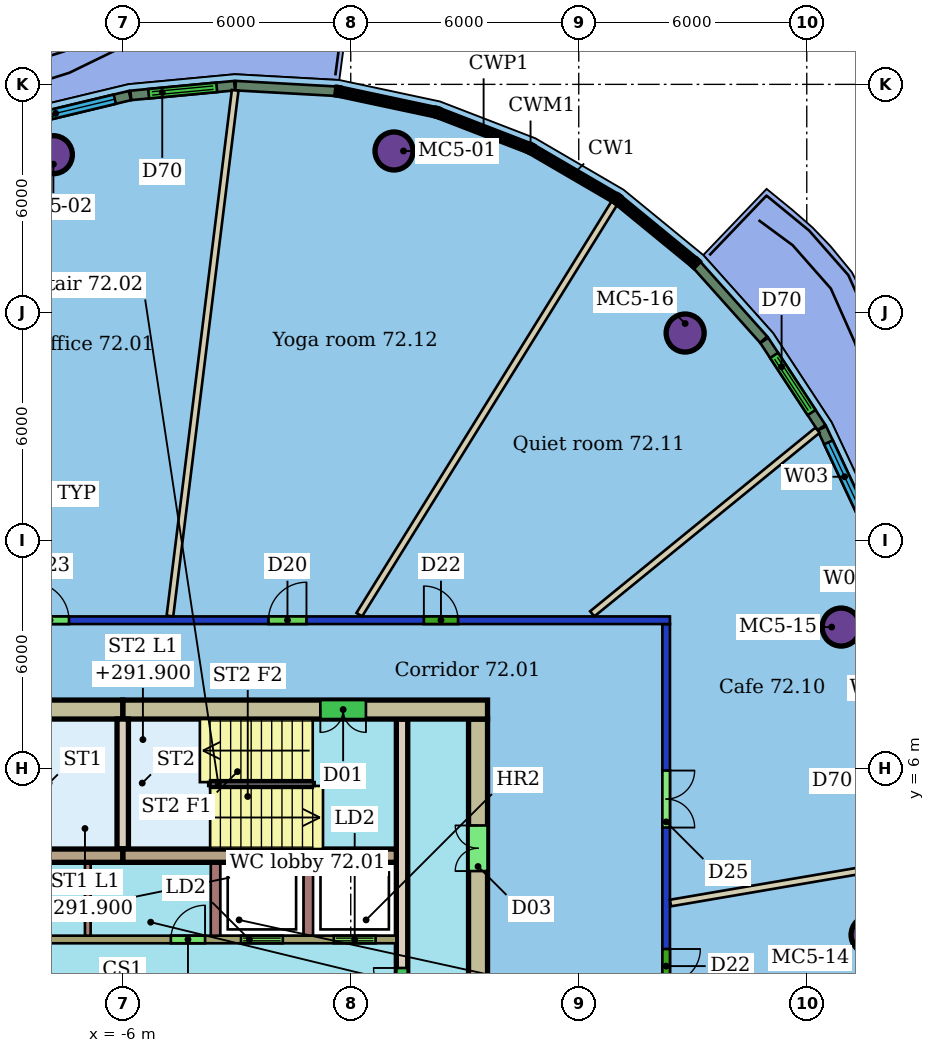
"""IFC4 building model, lengths in metres.
Left out: names, types, materials, properties, quantities, classifications, styles, units other than length and angle.
Written with IfcOpenShell. Run it as: python <this file> out.ifc"""

import sys

from ifc_helpers import new_model, si_unit, direction, frame, frame_2d, origin, origin_2d, place, context, subcontext, project, spatial, rectangle, hollow_circle, extrude, element, fill, save


model = new_model("IFC4")
c1 = context("Model", 3, precision=1e-05, world=origin(), true_north=direction((0.0, 1.0)))
c2 = subcontext(c1, "Body", "Model", "MODEL_VIEW")
j1 = project(units=[si_unit("LENGTHUNIT", "METRE"), si_unit("PLANEANGLEUNIT", "RADIAN")], contexts=[c1])
p1 = place(None, origin())
s1 = spatial("IfcSite", under=j1, at=p1, CompositionType="ELEMENT")
p2 = place(p1, origin())
s2 = spatial("IfcBuilding", under=s1, at=p2, CompositionType="ELEMENT")
p3 = place(p2, frame((0.0, 0.0, 290.1)))
s3 = spatial("IfcBuildingStorey", under=s2, at=p3, CompositionType="ELEMENT", Elevation=290.1)
for number, where, z_axis, x_axis in (
    (1, (1.138, 22.247, 0.0), (0.0, 0.0, 1.0), (1.0, 0.0, 0.0)),
    (2, (-7.825, 22.149, 0.0), (0.0, 0.0, 1.0), (1.0, 0.0, 0.0)),
    (3, (13.666, 1.62, 0.0), (0.0, 0.0, 1.0), (1.0, 0.0, 0.0)),
    (4, (12.906, 9.72, 0.0), (0.0, 0.0, 1.0), (1.0, 0.0, 0.0)),
    (5, (8.8, 17.457, 0.0), (0.0, 0.0, 1.0), (1.0, 0.0, 0.0)),
):
    element("IfcColumn", number, at=place(p3, frame(where, z_axis=z_axis, x_axis=x_axis)), inside=s3, PredefinedType="COLUMN", context=c2, shape_type="SweptSolid", body=[
        extrude(hollow_circle(Radius=0.5, WallThickness=0.04, at=origin_2d()), origin(), (0.0, 0.0, 1.0), 3.45),
    ])
p4 = place(p3, frame((-20.4, 9.9, 0.0), z_axis=(0.0, 0.0, 1.0), x_axis=(1.0, 0.0, 0.0)))
e6 = element("IfcWall", 6, at=p4, inside=s3, PredefinedType="PARTITIONING", context=c2, shape_type="SweptSolid", body=[
    extrude(rectangle(XDim=28.8, YDim=0.2, at=frame_2d((14.4, 0.0))), origin(), (0.0, 0.0, 1.0), 3.1),
])
p5 = place(p4, frame((11.987, 0.0, 0.0)))
e7 = element("IfcOpeningElement", 7, at=p5, cuts=e6, PredefinedType="OPENING", context=c2, shape_type="SweptSolid", body=[
    extrude(rectangle(XDim=1.0, YDim=2.4, at=frame_2d((0.5, 1.2))), frame((0.0, 0.11, 0.0), z_axis=(0.0, -1.0, 0.0), x_axis=(1.0, 0.0, 0.0)), (0.0, 0.0, 1.0), 0.22),
])
p6 = place(p4, frame((5.934, 0.0, 0.0)))
e8 = element("IfcOpeningElement", 8, at=p6, cuts=e6, PredefinedType="OPENING", context=c2, shape_type="SweptSolid", body=[
    extrude(rectangle(XDim=1.8, YDim=2.4, at=frame_2d((0.9, 1.2))), frame((0.0, 0.11, 0.0), z_axis=(0.0, -1.0, 0.0), x_axis=(1.0, 0.0, 0.0)), (0.0, 0.0, 1.0), 0.22),
])
p7 = place(p4, frame((22.324, 0.0, 0.0)))
e9 = element("IfcOpeningElement", 9, at=p7, cuts=e6, PredefinedType="OPENING", context=c2, shape_type="SweptSolid", body=[
    extrude(rectangle(XDim=0.9, YDim=2.1, at=frame_2d((0.45, 1.05))), frame((0.0, 0.11, 0.0), z_axis=(0.0, -1.0, 0.0), x_axis=(1.0, 0.0, 0.0)), (0.0, 0.0, 1.0), 0.22),
])
p8 = place(p4, frame((18.235, 0.0, 0.0)))
e10 = element("IfcOpeningElement", 10, at=p8, cuts=e6, PredefinedType="OPENING", context=c2, shape_type="SweptSolid", body=[
    extrude(rectangle(XDim=1.0, YDim=2.1, at=frame_2d((0.5, 1.05))), frame((0.0, 0.11, 0.0), z_axis=(0.0, -1.0, 0.0), x_axis=(1.0, 0.0, 0.0)), (0.0, 0.0, 1.0), 0.22),
])
p9 = place(p3, frame((8.3, 9.8, 0.0), z_axis=(0.0, 0.0, 1.0), x_axis=(0.0, -1.0, 0.0)))
e11 = element("IfcWall", 11, at=p9, inside=s3, PredefinedType="PARTITIONING", context=c2, shape_type="SweptSolid", body=[
    extrude(rectangle(XDim=19.6, YDim=0.2, at=frame_2d((9.8, 0.0))), origin(), (0.0, 0.0, 1.0), 3.1),
])
p10 = place(p9, frame((13.839, 0.0, 0.0)))
e12 = element("IfcOpeningElement", 12, at=p10, cuts=e11, PredefinedType="OPENING", context=c2, shape_type="SweptSolid", body=[
    extrude(rectangle(XDim=1.5, YDim=2.1, at=frame_2d((0.75, 1.05))), frame((0.0, 0.11, 0.0), z_axis=(0.0, -1.0, 0.0), x_axis=(1.0, 0.0, 0.0)), (0.0, 0.0, 1.0), 0.22),
])
p11 = place(p9, frame((8.55, 0.0, 0.0)))
e13 = element("IfcOpeningElement", 13, at=p11, cuts=e11, PredefinedType="OPENING", context=c2, shape_type="SweptSolid", body=[
    extrude(rectangle(XDim=0.9, YDim=2.1, at=frame_2d((0.45, 1.05))), frame((0.0, 0.11, 0.0), z_axis=(0.0, -1.0, 0.0), x_axis=(1.0, 0.0, 0.0)), (0.0, 0.0, 1.0), 0.22),
])
p12 = place(p9, frame((3.855, 0.0, 0.0)))
e14 = element("IfcOpeningElement", 14, at=p12, cuts=e11, PredefinedType="OPENING", context=c2, shape_type="SweptSolid", body=[
    extrude(rectangle(XDim=1.5, YDim=2.4, at=frame_2d((0.75, 1.2))), frame((0.0, 0.11, 0.0), z_axis=(0.0, -1.0, 0.0), x_axis=(1.0, 0.0, 0.0)), (0.0, 0.0, 1.0), 0.22),
])
p13 = place(p3, frame((-3.042, 23.842, 0.0), z_axis=(0.0, 0.0, 1.0), x_axis=(-0.123142143045, -0.99238904297, 0.0)))
e15 = element("IfcWall", 15, at=p13, inside=s3, PredefinedType="PARTITIONING", context=c2, shape_type="SweptSolid", body=[
    extrude(rectangle(XDim=13.938, YDim=0.175, at=frame_2d((6.969, 0.0))), origin(), (0.0, 0.0, 1.0), 3.45),
])
p14 = place(p3, frame((15.029, 3.588, 0.0), z_axis=(0.0, 0.0, 1.0), x_axis=(-0.985756294693, -0.168180044814, 0.0)))
e16 = element("IfcWall", 16, at=p14, inside=s3, PredefinedType="PARTITIONING", context=c2, shape_type="SweptSolid", body=[
    extrude(rectangle(XDim=6.709, YDim=0.175, at=frame_2d((3.355, 0.0))), origin(), (0.0, 0.0, 1.0), 3.45),
])
p15 = place(p3, frame((12.284, 14.9, 0.0), z_axis=(0.0, 0.0, 1.0), x_axis=(-0.775191568624, -0.631726231792, 0.0)))
e17 = element("IfcWall", 17, at=p15, inside=s3, PredefinedType="PARTITIONING", context=c2, shape_type="SweptSolid", body=[
    extrude(rectangle(XDim=7.649, YDim=0.175, at=frame_2d((3.825, 0.0))), origin(), (0.0, 0.0, 1.0), 3.45),
])
p16 = place(p3, frame((6.938, 20.878, 0.0), z_axis=(0.0, 0.0, 1.0), x_axis=(-0.526747010392, -0.850022109738, 0.0)))
e18 = element("IfcWall", 18, at=p16, inside=s3, PredefinedType="PARTITIONING", context=c2, shape_type="SweptSolid", body=[
    extrude(rectangle(XDim=12.743, YDim=0.175, at=frame_2d((6.371, 0.0))), origin(), (0.0, 0.0, 1.0), 3.45),
])
p17 = place(p3, frame((-0.396, 23.82, 0.0), z_axis=(0.0, 0.0, 1.0), x_axis=(-0.998463198624, 0.055418778352, 0.0)))
e19 = element("IfcWall", 19, at=p17, inside=s3, PredefinedType="SOLIDWALL", context=c2, shape_type="SweptSolid", body=[
    extrude(rectangle(XDim=2.639, YDim=0.25, at=frame_2d((1.319, 0.0))), origin(), (0.0, 0.0, 1.0), 3.15),
])
p18 = place(p3, frame((-3.057, 23.966, 0.0), z_axis=(0.0, 0.0, 1.0), x_axis=(-0.995626981475, -0.093417952019, 0.0)))
e20 = element("IfcWall", 20, at=p18, inside=s3, PredefinedType="SOLIDWALL", context=c2, shape_type="SweptSolid", body=[
    extrude(rectangle(XDim=2.741, YDim=0.25, at=frame_2d((1.371, 0.0))), origin(), (0.0, 0.0, 1.0), 3.15),
])
p19 = place(p18, frame((0.471, 0.0, 0.0)))
e21 = element("IfcOpeningElement", 21, at=p19, cuts=e20, PredefinedType="OPENING", context=c2, shape_type="SweptSolid", body=[
    extrude(rectangle(XDim=1.8, YDim=2.4, at=frame_2d((0.9, 1.2))), frame((0.0, 0.135, 0.0), z_axis=(0.0, -1.0, 0.0), x_axis=(1.0, 0.0, 0.0)), (0.0, 0.0, 1.0), 0.27),
])
p20 = place(p3, frame((-5.812, 23.706, 0.0), z_axis=(0.0, 0.0, 1.0), x_axis=(-0.972306924108, -0.233707606491, 0.0)))
e22 = element("IfcWall", 22, at=p20, inside=s3, PredefinedType="SOLIDWALL", context=c2, shape_type="SweptSolid", body=[
    extrude(rectangle(XDim=2.814, YDim=0.25, at=frame_2d((1.407, 0.0))), origin(), (0.0, 0.0, 1.0), 3.15),
])
p21 = place(p20, frame((0.407, 0.0, 0.9)))
e23 = element("IfcOpeningElement", 23, at=p21, cuts=e22, PredefinedType="OPENING", context=c2, shape_type="SweptSolid", body=[
    extrude(rectangle(XDim=2.0, YDim=2.1, at=frame_2d((1.0, 1.05))), frame((0.0, 0.135, 0.0), z_axis=(0.0, -1.0, 0.0), x_axis=(1.0, 0.0, 0.0)), (0.0, 0.0, 1.0), 0.27),
])
p22 = place(p3, frame((13.594, 12.401, 0.0), z_axis=(0.0, 0.0, 1.0), x_axis=(-0.424551668491, 0.905403711491, 0.0)))
e24 = element("IfcWall", 24, at=p22, inside=s3, PredefinedType="SOLIDWALL", context=c2, shape_type="SweptSolid", body=[
    extrude(rectangle(XDim=2.814, YDim=0.25, at=frame_2d((1.407, 0.0))), origin(), (0.0, 0.0, 1.0), 3.15),
])
p23 = place(p22, frame((0.407, 0.0, 0.9)))
e25 = element("IfcOpeningElement", 25, at=p23, cuts=e24, PredefinedType="OPENING", context=c2, shape_type="SweptSolid", body=[
    extrude(rectangle(XDim=2.0, YDim=2.1, at=frame_2d((1.0, 1.05))), frame((0.0, 0.135, 0.0), z_axis=(0.0, -1.0, 0.0), x_axis=(1.0, 0.0, 0.0)), (0.0, 0.0, 1.0), 0.27),
])
p24 = place(p3, frame((12.386, 14.972, 0.0), z_axis=(0.0, 0.0, 1.0), x_axis=(-0.548705074574, 0.83601599335, 0.0)))
e26 = element("IfcWall", 26, at=p24, inside=s3, PredefinedType="SOLIDWALL", context=c2, shape_type="SweptSolid", body=[
    extrude(rectangle(XDim=2.741, YDim=0.25, at=frame_2d((1.371, 0.0))), origin(), (0.0, 0.0, 1.0), 3.15),
])
p25 = place(p24, frame((0.471, 0.0, 0.0)))
e27 = element("IfcOpeningElement", 27, at=p25, cuts=e26, PredefinedType="OPENING", context=c2, shape_type="SweptSolid", body=[
    extrude(rectangle(XDim=1.8, YDim=2.4, at=frame_2d((0.9, 1.2))), frame((0.0, 0.135, 0.0), z_axis=(0.0, -1.0, 0.0), x_axis=(1.0, 0.0, 0.0)), (0.0, 0.0, 1.0), 0.27),
])
p26 = place(p3, frame((10.866, 17.285, 0.0), z_axis=(0.0, 0.0, 1.0), x_axis=(-0.666789450608, 0.745246152997, 0.0)))
e28 = element("IfcWall", 28, at=p26, inside=s3, PredefinedType="SOLIDWALL", context=c2, shape_type="SweptSolid", body=[
    extrude(rectangle(XDim=2.639, YDim=0.25, at=frame_2d((1.319, 0.0))), origin(), (0.0, 0.0, 1.0), 3.15),
])
p27 = place(p3, frame((3.6, 7.55, 0.0), z_axis=(0.0, 0.0, 1.0), x_axis=(-1.0, 0.0, 0.0)))
e29 = element("IfcWall", 29, at=p27, inside=s3, PredefinedType="SHEAR", context=c2, shape_type="SweptSolid", body=[
    extrude(rectangle(XDim=9.6, YDim=0.5, at=frame_2d((4.8, 0.0))), origin(), (0.0, 0.0, 1.0), 3.3),
])
p28 = place(p27, frame((3.2, 0.0, 0.0)))
e30 = element("IfcOpeningElement", 30, at=p28, cuts=e29, PredefinedType="OPENING", context=c2, shape_type="SweptSolid", body=[
    extrude(rectangle(XDim=1.2, YDim=2.1, at=frame_2d((0.6, 1.05))), frame((0.0, 0.26, 0.0), z_axis=(0.0, -1.0, 0.0), x_axis=(1.0, 0.0, 0.0)), (0.0, 0.0, 1.0), 0.52),
])
p29 = place(p3, frame((-6.0, 7.55, 0.0), z_axis=(0.0, 0.0, 1.0), x_axis=(-1.0, 0.0, 0.0)))
e31 = element("IfcWall", 31, at=p29, inside=s3, PredefinedType="SHEAR", context=c2, shape_type="SweptSolid", body=[
    extrude(rectangle(XDim=9.6, YDim=0.5, at=frame_2d((4.8, 0.0))), origin(), (0.0, 0.0, 1.0), 3.3),
])
p30 = place(p29, frame((5.2, 0.0, 0.0)))
e32 = element("IfcOpeningElement", 32, at=p30, cuts=e31, PredefinedType="OPENING", context=c2, shape_type="SweptSolid", body=[
    extrude(rectangle(XDim=1.2, YDim=2.1, at=frame_2d((0.6, 1.05))), frame((0.0, 0.26, 0.0), z_axis=(0.0, -1.0, 0.0), x_axis=(1.0, 0.0, 0.0)), (0.0, 0.0, 1.0), 0.52),
])
p31 = place(p3, frame((3.35, -7.3, 0.0), z_axis=(0.0, 0.0, 1.0), x_axis=(0.0, 1.0, 0.0)))
e33 = element("IfcWall", 33, at=p31, inside=s3, PredefinedType="SHEAR", context=c2, shape_type="SweptSolid", body=[
    extrude(rectangle(XDim=14.6, YDim=0.5, at=frame_2d((7.3, 0.0))), origin(), (0.0, 0.0, 1.0), 3.3),
])
p32 = place(p31, frame((2.8, 0.0, 0.0)))
e34 = element("IfcOpeningElement", 34, at=p32, cuts=e33, PredefinedType="OPENING", context=c2, shape_type="SweptSolid", body=[
    extrude(rectangle(XDim=1.2, YDim=2.1, at=frame_2d((0.6, 1.05))), frame((0.0, 0.26, 0.0), z_axis=(0.0, -1.0, 0.0), x_axis=(1.0, 0.0, 0.0)), (0.0, 0.0, 1.0), 0.52),
])
p33 = place(p31, frame((10.6, 0.0, 0.0)))
e35 = element("IfcOpeningElement", 35, at=p33, cuts=e33, PredefinedType="OPENING", context=c2, shape_type="SweptSolid", body=[
    extrude(rectangle(XDim=1.2, YDim=2.1, at=frame_2d((0.6, 1.05))), frame((0.0, 0.26, 0.0), z_axis=(0.0, -1.0, 0.0), x_axis=(1.0, 0.0, 0.0)), (0.0, 0.0, 1.0), 0.52),
])
for number, where, z_axis, x_axis in (
    (36, (-13.2, 3.705, 0.0), (0.0, 0.0, 1.0), (1.0, 0.0, 0.0)),
    (37, (-6.0, 3.705, 0.0), (0.0, 0.0, 1.0), (1.0, 0.0, 0.0)),
):
    element("IfcWall", number, at=place(p3, frame(where, z_axis=z_axis, x_axis=x_axis)), inside=s3, PredefinedType="SHEAR", context=c2, shape_type="SweptSolid", body=[
        extrude(rectangle(XDim=7.2, YDim=0.35, at=frame_2d((3.6, 0.0))), origin(), (0.0, 0.0, 1.0), 3.3),
    ])
p34 = place(p3, frame((1.35, -7.3, 0.0), z_axis=(0.0, 0.0, 1.0), x_axis=(0.0, 1.0, 0.0)))
e38 = element("IfcWall", 38, at=p34, inside=s3, PredefinedType="SHEAR", context=c2, shape_type="SweptSolid", body=[
    extrude(rectangle(XDim=14.6, YDim=0.3, at=frame_2d((7.3, 0.0))), origin(), (0.0, 0.0, 1.0), 3.3),
])
p35 = place(p34, frame((1.21, 0.0, 0.0)))
e39 = element("IfcOpeningElement", 39, at=p35, cuts=e38, PredefinedType="OPENING", context=c2, shape_type="SweptSolid", body=[
    extrude(rectangle(XDim=1.0, YDim=2.1, at=frame_2d((0.5, 1.05))), frame((0.0, 0.16, 0.0), z_axis=(0.0, -1.0, 0.0), x_axis=(1.0, 0.0, 0.0)), (0.0, 0.0, 1.0), 0.32),
])
p36 = place(p34, frame((6.55, 0.0, 0.0)))
e40 = element("IfcOpeningElement", 40, at=p36, cuts=e38, PredefinedType="OPENING", context=c2, shape_type="SweptSolid", body=[
    extrude(rectangle(XDim=1.5, YDim=2.1, at=frame_2d((0.75, 1.05))), frame((0.0, 0.16, 0.0), z_axis=(0.0, -1.0, 0.0), x_axis=(1.0, 0.0, 0.0)), (0.0, 0.0, 1.0), 0.32),
])
p37 = place(p3, frame((-13.2, 1.5, 0.0), z_axis=(0.0, 0.0, 1.0), x_axis=(1.0, 0.0, 0.0)))
e41 = element("IfcWall", 41, at=p37, inside=s3, PredefinedType="SHEAR", context=c2, shape_type="SweptSolid", body=[
    extrude(rectangle(XDim=14.4, YDim=0.2, at=frame_2d((7.2, 0.0))), origin(), (0.0, 0.0, 1.0), 3.3),
])
p38 = place(p37, frame((10.312, 0.0, 0.0)))
e42 = element("IfcOpeningElement", 42, at=p38, cuts=e41, PredefinedType="OPENING", context=c2, shape_type="SweptSolid", body=[
    extrude(rectangle(XDim=1.1, YDim=2.1, at=frame_2d((0.55, 1.05))), frame((0.0, 0.11, 0.0), z_axis=(0.0, -1.0, 0.0), x_axis=(1.0, 0.0, 0.0)), (0.0, 0.0, 1.0), 0.22),
])
p39 = place(p37, frame((12.754, 0.0, 0.0)))
e43 = element("IfcOpeningElement", 43, at=p39, cuts=e41, PredefinedType="OPENING", context=c2, shape_type="SweptSolid", body=[
    extrude(rectangle(XDim=1.1, YDim=2.1, at=frame_2d((0.55, 1.05))), frame((0.0, 0.11, 0.0), z_axis=(0.0, -1.0, 0.0), x_axis=(1.0, 0.0, 0.0)), (0.0, 0.0, 1.0), 0.22),
])
p40 = place(p37, frame((0.15, 0.0, 0.0)))
e44 = element("IfcOpeningElement", 44, at=p40, cuts=e41, PredefinedType="OPENING", context=c2, shape_type="SweptSolid", body=[
    extrude(rectangle(XDim=1.0, YDim=2.1, at=frame_2d((0.5, 1.05))), frame((0.0, 0.11, 0.0), z_axis=(0.0, -1.0, 0.0), x_axis=(1.0, 0.0, 0.0)), (0.0, 0.0, 1.0), 0.22),
])
p41 = place(p37, frame((3.365, 0.0, 0.0)))
e45 = element("IfcOpeningElement", 45, at=p41, cuts=e41, PredefinedType="OPENING", context=c2, shape_type="SweptSolid", body=[
    extrude(rectangle(XDim=1.0, YDim=2.1, at=frame_2d((0.5, 1.05))), frame((0.0, 0.11, 0.0), z_axis=(0.0, -1.0, 0.0), x_axis=(1.0, 0.0, 0.0)), (0.0, 0.0, 1.0), 0.22),
])
p42 = place(p37, frame((8.467, 0.0, 0.0)))
e46 = element("IfcOpeningElement", 46, at=p42, cuts=e41, PredefinedType="OPENING", context=c2, shape_type="SweptSolid", body=[
    extrude(rectangle(XDim=0.9, YDim=2.1, at=frame_2d((0.45, 1.05))), frame((0.0, 0.11, 0.0), z_axis=(0.0, -1.0, 0.0), x_axis=(1.0, 0.0, 0.0)), (0.0, 0.0, 1.0), 0.22),
])
p43 = place(p3, frame((-6.0, 3.88, 0.0), z_axis=(0.0, 0.0, 1.0), x_axis=(0.0, 1.0, 0.0)))
e47 = element("IfcWall", 47, at=p43, inside=s3, PredefinedType="SHEAR", context=c2, shape_type="SweptSolid", body=[
    extrude(rectangle(XDim=3.42, YDim=0.3, at=frame_2d((1.71, 0.0))), origin(), (0.0, 0.0, 1.0), 3.3),
])
for number, where, z_axis, x_axis in (
    (48, (-3.558, 1.6, 0.0), (0.0, 0.0, 1.0), (0.0, 1.0, 0.0)),
    (49, (-1.117, 1.6, 0.0), (0.0, 0.0, 1.0), (0.0, 1.0, 0.0)),
):
    element("IfcWall", number, at=place(p3, frame(where, z_axis=z_axis, x_axis=x_axis)), inside=s3, PredefinedType="SHEAR", context=c2, shape_type="SweptSolid", body=[
        extrude(rectangle(XDim=1.93, YDim=0.25, at=frame_2d((0.965, 0.0))), origin(), (0.0, 0.0, 1.0), 3.3),
    ])
p44 = place(p3, frame((-6.919, 1.6, 0.0), z_axis=(0.0, 0.0, 1.0), x_axis=(0.0, 1.0, 0.0)))
e50 = element("IfcWall", 50, at=p44, inside=s3, PredefinedType="PARTITIONING", context=c2, shape_type="SweptSolid", body=[
    extrude(rectangle(XDim=1.93, YDim=0.15, at=frame_2d((0.965, 0.0))), origin(), (0.0, 0.0, 1.0), 3.3),
])
p45 = place(p5, origin())
e51 = element("IfcDoor", 51, at=p45, inside=s3, OperationType="SINGLE_SWING_LEFT", PredefinedType="DOOR", context=c2, shape_type="SweptSolid", body=[
    extrude(rectangle(XDim=1.0, YDim=2.4, at=frame_2d((0.5, 1.2))), frame((0.0, 0.025, 0.0), z_axis=(0.0, -1.0, 0.0), x_axis=(1.0, 0.0, 0.0)), (0.0, 0.0, 1.0), 0.05),
])
fill(e7, e51)
p46 = place(p11, origin())
e52 = element("IfcDoor", 52, at=p46, inside=s3, OperationType="SINGLE_SWING_LEFT", PredefinedType="DOOR", context=c2, shape_type="SweptSolid", body=[
    extrude(rectangle(XDim=0.9, YDim=2.1, at=frame_2d((0.45, 1.05))), frame((0.0, 0.025, 0.0), z_axis=(0.0, -1.0, 0.0), x_axis=(1.0, 0.0, 0.0)), (0.0, 0.0, 1.0), 0.05),
])
fill(e13, e52)
p47 = place(p12, origin())
e53 = element("IfcDoor", 53, at=p47, inside=s3, OperationType="DOUBLE_DOOR_SINGLE_SWING", PredefinedType="DOOR", context=c2, shape_type="SweptSolid", body=[
    extrude(rectangle(XDim=1.5, YDim=2.4, at=frame_2d((0.75, 1.2))), frame((0.0, 0.025, 0.0), z_axis=(0.0, -1.0, 0.0), x_axis=(1.0, 0.0, 0.0)), (0.0, 0.0, 1.0), 0.05),
])
fill(e14, e53)
p48 = place(p7, origin())
e54 = element("IfcDoor", 54, at=p48, inside=s3, OperationType="SINGLE_SWING_LEFT", PredefinedType="DOOR", context=c2, shape_type="SweptSolid", body=[
    extrude(rectangle(XDim=0.9, YDim=2.1, at=frame_2d((0.45, 1.05))), frame((0.0, 0.025, 0.0), z_axis=(0.0, -1.0, 0.0), x_axis=(1.0, 0.0, 0.0)), (0.0, 0.0, 1.0), 0.05),
])
fill(e9, e54)
p49 = place(p8, origin())
e55 = element("IfcDoor", 55, at=p49, inside=s3, OperationType="SINGLE_SWING_RIGHT", PredefinedType="DOOR", context=c2, shape_type="SweptSolid", body=[
    extrude(rectangle(XDim=1.0, YDim=2.1, at=frame_2d((0.5, 1.05))), frame((0.0, 0.025, 0.0), z_axis=(0.0, -1.0, 0.0), x_axis=(1.0, 0.0, 0.0)), (0.0, 0.0, 1.0), 0.05),
])
fill(e10, e55)
p50 = place(p19, origin())
e56 = element("IfcDoor", 56, at=p50, inside=s3, OperationType="DOUBLE_DOOR_SLIDING", PredefinedType="DOOR", context=c2, shape_type="SweptSolid", body=[
    extrude(rectangle(XDim=1.8, YDim=2.4, at=frame_2d((0.9, 1.2))), frame((0.0, 0.025, 0.0), z_axis=(0.0, -1.0, 0.0), x_axis=(1.0, 0.0, 0.0)), (0.0, 0.0, 1.0), 0.05),
])
fill(e21, e56)
p51 = place(p21, origin())
e57 = element("IfcWindow", 57, at=p51, inside=s3, PartitioningType="SINGLE_PANEL", PredefinedType="WINDOW", context=c2, shape_type="SweptSolid", body=[
    extrude(rectangle(XDim=2.0, YDim=2.1, at=frame_2d((1.0, 1.05))), frame((0.0, 0.03, 0.0), z_axis=(0.0, -1.0, 0.0), x_axis=(1.0, 0.0, 0.0)), (0.0, 0.0, 1.0), 0.06),
])
fill(e23, e57)
p52 = place(p23, origin())
e58 = element("IfcWindow", 58, at=p52, inside=s3, PartitioningType="SINGLE_PANEL", PredefinedType="WINDOW", context=c2, shape_type="SweptSolid", body=[
    extrude(rectangle(XDim=2.0, YDim=2.1, at=frame_2d((1.0, 1.05))), frame((0.0, 0.03, 0.0), z_axis=(0.0, -1.0, 0.0), x_axis=(1.0, 0.0, 0.0)), (0.0, 0.0, 1.0), 0.06),
])
fill(e25, e58)
p53 = place(p25, origin())
e59 = element("IfcDoor", 59, at=p53, inside=s3, OperationType="DOUBLE_DOOR_SLIDING", PredefinedType="DOOR", context=c2, shape_type="SweptSolid", body=[
    extrude(rectangle(XDim=1.8, YDim=2.4, at=frame_2d((0.9, 1.2))), frame((0.0, 0.025, 0.0), z_axis=(0.0, -1.0, 0.0), x_axis=(1.0, 0.0, 0.0)), (0.0, 0.0, 1.0), 0.05),
])
fill(e27, e59)
p54 = place(p28, origin())
e60 = element("IfcDoor", 60, at=p54, inside=s3, OperationType="DOUBLE_DOOR_SINGLE_SWING", PredefinedType="NOTDEFINED", context=c2, shape_type="SweptSolid", body=[
    extrude(rectangle(XDim=1.2, YDim=2.1, at=frame_2d((0.6, 1.05))), frame((0.0, 0.025, 0.0), z_axis=(0.0, -1.0, 0.0), x_axis=(1.0, 0.0, 0.0)), (0.0, 0.0, 1.0), 0.05),
])
fill(e30, e60)
p55 = place(p33, origin())
e61 = element("IfcDoor", 61, at=p55, inside=s3, OperationType="DOUBLE_DOOR_SINGLE_SWING", PredefinedType="NOTDEFINED", context=c2, shape_type="SweptSolid", body=[
    extrude(rectangle(XDim=1.2, YDim=2.1, at=frame_2d((0.6, 1.05))), frame((0.0, 0.025, 0.0), z_axis=(0.0, -1.0, 0.0), x_axis=(1.0, 0.0, 0.0)), (0.0, 0.0, 1.0), 0.05),
])
fill(e35, e61)
p56 = place(p36, origin())
e62 = element("IfcDoor", 62, at=p56, inside=s3, OperationType="DOUBLE_DOOR_SINGLE_SWING", PredefinedType="NOTDEFINED", context=c2, shape_type="SweptSolid", body=[
    extrude(rectangle(XDim=1.5, YDim=2.1, at=frame_2d((0.75, 1.05))), frame((0.0, 0.025, 0.0), z_axis=(0.0, -1.0, 0.0), x_axis=(1.0, 0.0, 0.0)), (0.0, 0.0, 1.0), 0.05),
])
fill(e40, e62)
p57 = place(p38, origin())
e63 = element("IfcDoor", 63, at=p57, inside=s3, OperationType="DOUBLE_DOOR_SLIDING", PredefinedType="NOTDEFINED", context=c2, shape_type="SweptSolid", body=[
    extrude(rectangle(XDim=1.1, YDim=2.1, at=frame_2d((0.55, 1.05))), frame((0.0, 0.025, 0.0), z_axis=(0.0, -1.0, 0.0), x_axis=(1.0, 0.0, 0.0)), (0.0, 0.0, 1.0), 0.05),
])
fill(e42, e63)
p58 = place(p39, origin())
e64 = element("IfcDoor", 64, at=p58, inside=s3, OperationType="DOUBLE_DOOR_SLIDING", PredefinedType="NOTDEFINED", context=c2, shape_type="SweptSolid", body=[
    extrude(rectangle(XDim=1.1, YDim=2.1, at=frame_2d((0.55, 1.05))), frame((0.0, 0.025, 0.0), z_axis=(0.0, -1.0, 0.0), x_axis=(1.0, 0.0, 0.0)), (0.0, 0.0, 1.0), 0.05),
])
fill(e43, e64)
p59 = place(p42, origin())
e65 = element("IfcDoor", 65, at=p59, inside=s3, OperationType="SINGLE_SWING_RIGHT", PredefinedType="NOTDEFINED", context=c2, shape_type="SweptSolid", body=[
    extrude(rectangle(XDim=0.9, YDim=2.1, at=frame_2d((0.45, 1.05))), frame((0.0, 0.025, 0.0), z_axis=(0.0, -1.0, 0.0), x_axis=(1.0, 0.0, 0.0)), (0.0, 0.0, 1.0), 0.05),
])
fill(e46, e65)
save(model, sys.argv[1])
